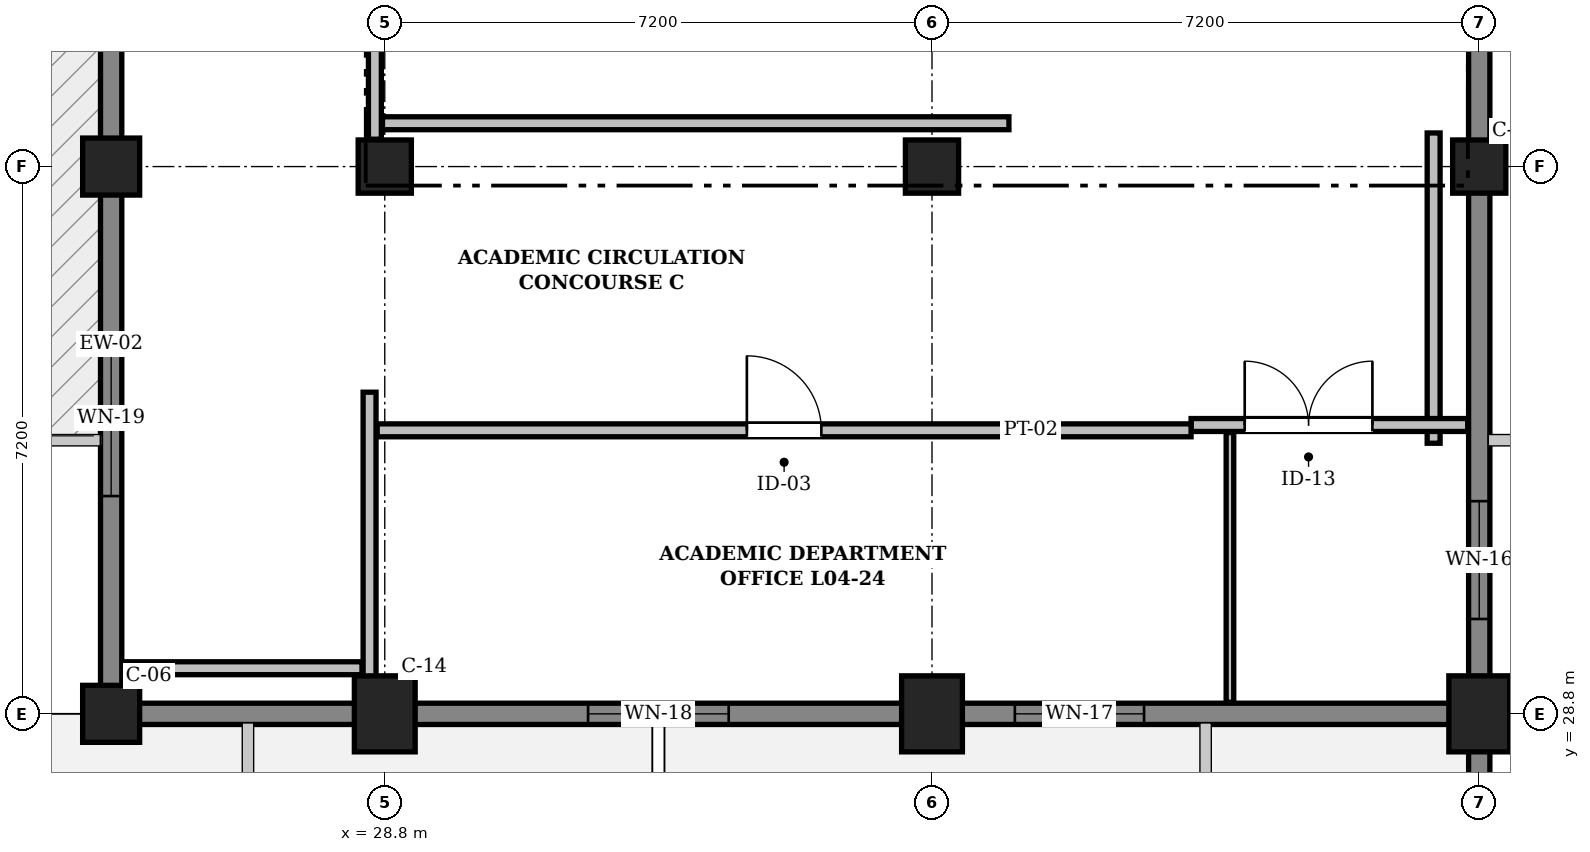
"""IFC4 building model, lengths in metres.
Left out: names, types, materials, properties, quantities, classifications, styles, units other than length and angle.
Written with IfcOpenShell. Run it as: python <this file> out.ifc"""

import sys

from ifc_helpers import new_model, si_unit, direction, frame, frame_2d, origin, origin_2d, place, context, subcontext, project, spatial, rectangle, extrude, element, fill, save


model = new_model("IFC4")
c1 = context("Model", 3, precision=1e-05, world=origin(), true_north=direction((0.0, 1.0)))
c2 = subcontext(c1, "Body", "Model", "MODEL_VIEW")
j1 = project(units=[si_unit("LENGTHUNIT", "METRE"), si_unit("PLANEANGLEUNIT", "RADIAN")], contexts=[c1])
p1 = place(None, origin())
s1 = spatial("IfcSite", under=j1, at=p1, CompositionType="ELEMENT")
p2 = place(p1, origin())
s2 = spatial("IfcBuilding", under=s1, at=p2, CompositionType="ELEMENT")
p3 = place(p2, frame((0.0, 0.0, 18.9)))
s3 = spatial("IfcBuildingStorey", under=s2, at=p3, CompositionType="ELEMENT", Elevation=18.9)
for number, where, z_axis, x_axis in (
    (1, (25.2, 28.8, 0.0), (0.0, 0.0, 1.0), (1.0, 0.0, 0.0)),
    (2, (25.2, 36.0, 0.0), (0.0, 0.0, 1.0), (1.0, 0.0, 0.0)),
):
    element("IfcColumn", number, at=place(p3, frame(where, z_axis=z_axis, x_axis=x_axis)), inside=s3, PredefinedType="COLUMN", context=c2, shape_type="SweptSolid", body=[
        extrude(rectangle(XDim=0.75, YDim=0.75, at=origin_2d()), origin(), (0.0, 0.0, 1.0), 4.5),
    ])
p4 = place(p3, frame((28.8, 28.8, 0.0), z_axis=(0.0, 0.0, 1.0), x_axis=(1.0, 0.0, 0.0)))
e3 = element("IfcColumn", 3, at=p4, inside=s3, PredefinedType="COLUMN", context=c2, shape_type="SweptSolid", body=[
    extrude(rectangle(XDim=0.8, YDim=1.0, at=origin_2d()), origin(), (0.0, 0.0, 1.0), 4.5),
])
p5 = place(p3, frame((28.8, 36.0, 0.0), z_axis=(0.0, 0.0, 1.0), x_axis=(1.0, 0.0, 0.0)))
e4 = element("IfcColumn", 4, at=p5, inside=s3, PredefinedType="COLUMN", context=c2, shape_type="SweptSolid", body=[
    extrude(rectangle(XDim=0.7, YDim=0.7, at=origin_2d()), origin(), (0.0, 0.0, 1.0), 4.5),
])
p6 = place(p3, frame((36.0, 28.8, 0.0), z_axis=(0.0, 0.0, 1.0), x_axis=(1.0, 0.0, 0.0)))
e5 = element("IfcColumn", 5, at=p6, inside=s3, PredefinedType="COLUMN", context=c2, shape_type="SweptSolid", body=[
    extrude(rectangle(XDim=0.8, YDim=1.0, at=origin_2d()), origin(), (0.0, 0.0, 1.0), 4.5),
])
p7 = place(p3, frame((36.0, 36.0, 0.0), z_axis=(0.0, 0.0, 1.0), x_axis=(1.0, 0.0, 0.0)))
e6 = element("IfcColumn", 6, at=p7, inside=s3, PredefinedType="COLUMN", context=c2, shape_type="SweptSolid", body=[
    extrude(rectangle(XDim=0.7, YDim=0.7, at=origin_2d()), origin(), (0.0, 0.0, 1.0), 4.5),
])
p8 = place(p3, frame((43.2, 28.8, 0.0), z_axis=(0.0, 0.0, 1.0), x_axis=(1.0, 0.0, 0.0)))
e7 = element("IfcColumn", 7, at=p8, inside=s3, PredefinedType="COLUMN", context=c2, shape_type="SweptSolid", body=[
    extrude(rectangle(XDim=0.8, YDim=1.0, at=origin_2d()), origin(), (0.0, 0.0, 1.0), 4.5),
])
p9 = place(p3, frame((43.2, 36.0, 0.0), z_axis=(0.0, 0.0, 1.0), x_axis=(1.0, 0.0, 0.0)))
e8 = element("IfcColumn", 8, at=p9, inside=s3, PredefinedType="COLUMN", context=c2, shape_type="SweptSolid", body=[
    extrude(rectangle(XDim=0.7, YDim=0.7, at=origin_2d()), origin(), (0.0, 0.0, 1.0), 4.5),
])
p10 = place(p3, frame((43.2, 21.6, 0.0), z_axis=(0.0, 0.0, 1.0), x_axis=(0.0, 1.0, 0.0)))
e9 = element("IfcWall", 9, at=p10, inside=s3, PredefinedType="SOLIDWALL", context=c2, shape_type="SweptSolid", body=[
    extrude(rectangle(XDim=7.034, YDim=0.28, at=frame_2d((3.517, 0.0))), origin(), (0.0, 0.0, 1.0), 4.22),
])
p11 = place(p10, frame((4.394, 0.0, 0.95)))
e10 = element("IfcOpeningElement", 10, at=p11, cuts=e9, PredefinedType="OPENING", context=c2, shape_type="SweptSolid", body=[
    extrude(rectangle(XDim=1.2, YDim=1.8, at=frame_2d((0.6, 0.9))), frame((0.0, 0.152, 0.0), z_axis=(0.0, -1.0, 0.0), x_axis=(1.0, 0.0, 0.0)), (0.0, 0.0, 1.0), 0.304),
])
p12 = place(p3, frame((43.2, 28.8, 0.0), z_axis=(0.0, 0.0, 1.0), x_axis=(1.0, 0.0, 0.0)))
e11 = element("IfcWall", 11, at=p12, inside=s3, PredefinedType="SOLIDWALL", context=c2, shape_type="SweptSolid", body=[
    extrude(rectangle(XDim=7.2, YDim=0.28, at=frame_2d((3.6, 0.0))), origin(), (0.0, 0.0, 1.0), 4.22),
])
p13 = place(p12, frame((2.875, 0.0, 0.95)))
e12 = element("IfcOpeningElement", 12, at=p13, cuts=e11, PredefinedType="OPENING", context=c2, shape_type="SweptSolid", body=[
    extrude(rectangle(XDim=1.45, YDim=1.8, at=frame_2d((0.725, 0.9))), frame((0.0, 0.152, 0.0), z_axis=(0.0, -1.0, 0.0), x_axis=(1.0, 0.0, 0.0)), (0.0, 0.0, 1.0), 0.304),
])
p14 = place(p3, frame((43.2, 43.2, 0.0), z_axis=(0.0, 0.0, 1.0), x_axis=(0.0, -1.0, 0.0)))
e13 = element("IfcWall", 13, at=p14, inside=s3, PredefinedType="SOLIDWALL", context=c2, shape_type="SweptSolid", body=[
    extrude(rectangle(XDim=7.2, YDim=0.28, at=frame_2d((3.6, 0.0))), origin(), (0.0, 0.0, 1.0), 4.22),
])
p15 = place(p14, frame((2.9, 0.0, 0.95)))
e14 = element("IfcOpeningElement", 14, at=p15, cuts=e13, PredefinedType="OPENING", context=c2, shape_type="SweptSolid", body=[
    extrude(rectangle(XDim=1.4, YDim=1.55, at=frame_2d((0.7, 0.775))), frame((0.0, 0.152, 0.0), z_axis=(0.0, -1.0, 0.0), x_axis=(1.0, 0.0, 0.0)), (0.0, 0.0, 1.0), 0.304),
])
p16 = place(p3, frame((43.2, 36.0, 0.0), z_axis=(0.0, 0.0, 1.0), x_axis=(0.0, -1.0, 0.0)))
e15 = element("IfcWall", 15, at=p16, inside=s3, PredefinedType="SOLIDWALL", context=c2, shape_type="SweptSolid", body=[
    extrude(rectangle(XDim=7.034, YDim=0.28, at=frame_2d((3.517, 0.0))), origin(), (0.0, 0.0, 1.0), 4.22),
])
p17 = place(p16, frame((4.402, 0.0, 0.95)))
e16 = element("IfcOpeningElement", 16, at=p17, cuts=e15, PredefinedType="OPENING", context=c2, shape_type="SweptSolid", body=[
    extrude(rectangle(XDim=1.55, YDim=1.55, at=frame_2d((0.775, 0.775))), frame((0.0, 0.152, 0.0), z_axis=(0.0, -1.0, 0.0), x_axis=(1.0, 0.0, 0.0)), (0.0, 0.0, 1.0), 0.304),
])
p18 = place(p3, frame((43.2, 28.8, 0.0), z_axis=(0.0, 0.0, 1.0), x_axis=(-1.0, 0.0, 0.0)))
e17 = element("IfcWall", 17, at=p18, inside=s3, PredefinedType="SOLIDWALL", context=c2, shape_type="SweptSolid", body=[
    extrude(rectangle(XDim=7.2, YDim=0.28, at=frame_2d((3.6, 0.0))), origin(), (0.0, 0.0, 1.0), 4.22),
])
p19 = place(p18, frame((4.41, 0.0, 0.95)))
e18 = element("IfcOpeningElement", 18, at=p19, cuts=e17, PredefinedType="OPENING", context=c2, shape_type="SweptSolid", body=[
    extrude(rectangle(XDim=1.7, YDim=1.55, at=frame_2d((0.85, 0.775))), frame((0.0, 0.152, 0.0), z_axis=(0.0, -1.0, 0.0), x_axis=(1.0, 0.0, 0.0)), (0.0, 0.0, 1.0), 0.304),
])
p20 = place(p3, frame((36.0, 28.8, 0.0), z_axis=(0.0, 0.0, 1.0), x_axis=(-1.0, 0.0, 0.0)))
e19 = element("IfcWall", 19, at=p20, inside=s3, PredefinedType="SOLIDWALL", context=c2, shape_type="SweptSolid", body=[
    extrude(rectangle(XDim=7.2, YDim=0.28, at=frame_2d((3.6, 0.0))), origin(), (0.0, 0.0, 1.0), 4.22),
])
p21 = place(p20, frame((2.675, 0.0, 0.95)))
e20 = element("IfcOpeningElement", 20, at=p21, cuts=e19, PredefinedType="OPENING", context=c2, shape_type="SweptSolid", body=[
    extrude(rectangle(XDim=1.85, YDim=1.55, at=frame_2d((0.925, 0.775))), frame((0.0, 0.152, 0.0), z_axis=(0.0, -1.0, 0.0), x_axis=(1.0, 0.0, 0.0)), (0.0, 0.0, 1.0), 0.304),
])
p22 = place(p3, frame((28.8, 28.8, 0.0), z_axis=(0.0, 0.0, 1.0), x_axis=(-1.0, 0.0, 0.0)))
e21 = element("IfcWall", 21, at=p22, inside=s3, PredefinedType="SOLIDWALL", context=c2, shape_type="SweptSolid", body=[
    extrude(rectangle(XDim=3.75, YDim=0.28, at=frame_2d((1.875, 0.0))), origin(), (0.0, 0.0, 1.0), 4.22),
])
p23 = place(p3, frame((25.2, 28.966, 0.0), z_axis=(0.0, 0.0, 1.0), x_axis=(0.0, 1.0, 0.0)))
e22 = element("IfcWall", 22, at=p23, inside=s3, PredefinedType="SOLIDWALL", context=c2, shape_type="SweptSolid", body=[
    extrude(rectangle(XDim=7.034, YDim=0.28, at=frame_2d((3.517, 0.0))), origin(), (0.0, 0.0, 1.0), 4.22),
])
p24 = place(p23, frame((2.699, 0.0, 0.95)))
e23 = element("IfcOpeningElement", 23, at=p24, cuts=e22, PredefinedType="OPENING", context=c2, shape_type="SweptSolid", body=[
    extrude(rectangle(XDim=2.05, YDim=1.55, at=frame_2d((1.025, 0.775))), frame((0.0, 0.152, 0.0), z_axis=(0.0, -1.0, 0.0), x_axis=(1.0, 0.0, 0.0)), (0.0, 0.0, 1.0), 0.304),
])
p25 = place(p3, frame((25.2, 36.0, 0.0), z_axis=(0.0, 0.0, 1.0), x_axis=(0.0, 1.0, 0.0)))
e24 = element("IfcWall", 24, at=p25, inside=s3, PredefinedType="SOLIDWALL", context=c2, shape_type="SweptSolid", body=[
    extrude(rectangle(XDim=7.2, YDim=0.28, at=frame_2d((3.6, 0.0))), origin(), (0.0, 0.0, 1.0), 4.22),
])
p26 = place(p25, frame((3.01, 0.0, 0.0)))
e25 = element("IfcOpeningElement", 25, at=p26, cuts=e24, PredefinedType="OPENING", context=c2, shape_type="SweptSolid", body=[
    extrude(rectangle(XDim=1.18, YDim=2.18, at=frame_2d((0.59, 1.09))), frame((0.0, 0.152, 0.0), z_axis=(0.0, -1.0, 0.0), x_axis=(1.0, 0.0, 0.0)), (0.0, 0.0, 1.0), 0.304),
])
p27 = place(p3, frame((28.67, 36.36, 0.0), z_axis=(0.0, 0.0, 1.0), x_axis=(0.0, 1.0, 0.0)))
e26 = element("IfcWall", 26, at=p27, inside=s3, PredefinedType="PARTITIONING", context=c2, shape_type="SweptSolid", body=[
    extrude(rectangle(XDim=6.48, YDim=0.17, at=frame_2d((3.24, 0.0))), origin(), (0.0, 0.0, 1.0), 3.73),
])
p28 = place(p27, frame((2.53, 0.0, 0.0)))
e27 = element("IfcOpeningElement", 27, at=p28, cuts=e26, PredefinedType="OPENING", context=c2, shape_type="SweptSolid", body=[
    extrude(rectangle(XDim=1.42, YDim=2.24, at=frame_2d((0.71, 1.12))), frame((0.0, 0.097, 0.0), z_axis=(0.0, -1.0, 0.0), x_axis=(1.0, 0.0, 0.0)), (0.0, 0.0, 1.0), 0.194),
])
p29 = place(p3, frame((28.6, 28.952, 0.0), z_axis=(0.0, 0.0, 1.0), x_axis=(0.0, 1.0, 0.0)))
e28 = element("IfcWall", 28, at=p29, inside=s3, PredefinedType="PARTITIONING", context=c2, shape_type="SweptSolid", body=[
    extrude(rectangle(XDim=4.08, YDim=0.17, at=frame_2d((2.04, 0.0))), origin(), (0.0, 0.0, 1.0), 3.73),
])
p30 = place(p3, frame((25.352, 29.4, 0.0), z_axis=(0.0, 0.0, 1.0), x_axis=(1.0, 0.0, 0.0)))
e29 = element("IfcWall", 29, at=p30, inside=s3, PredefinedType="PARTITIONING", context=c2, shape_type="SweptSolid", body=[
    extrude(rectangle(XDim=3.148, YDim=0.17, at=frame_2d((1.574, 0.0))), origin(), (0.0, 0.0, 1.0), 4.16),
])
p31 = place(p3, frame((42.6, 32.36, 0.0), z_axis=(0.0, 0.0, 1.0), x_axis=(0.0, 1.0, 0.0)))
e30 = element("IfcWall", 30, at=p31, inside=s3, PredefinedType="PARTITIONING", context=c2, shape_type="SweptSolid", body=[
    extrude(rectangle(XDim=4.082, YDim=0.17, at=frame_2d((2.041, 0.0))), origin(), (0.0, 0.0, 1.0), 4.16),
])
p32 = place(p3, frame((39.408, 32.6, 0.0), z_axis=(0.0, 0.0, 1.0), x_axis=(1.0, 0.0, 0.0)))
e31 = element("IfcWall", 31, at=p32, inside=s3, PredefinedType="PARTITIONING", context=c2, shape_type="SweptSolid", body=[
    extrude(rectangle(XDim=3.64, YDim=0.17, at=frame_2d((1.82, 0.0))), origin(), (0.0, 0.0, 1.0), 4.16),
])
p33 = place(p32, frame((0.706, 0.0, 0.0)))
e32 = element("IfcOpeningElement", 32, at=p33, cuts=e31, PredefinedType="OPENING", context=c2, shape_type="SweptSolid", body=[
    extrude(rectangle(XDim=1.68, YDim=2.28, at=frame_2d((0.84, 1.14))), frame((0.0, 0.097, 0.0), z_axis=(0.0, -1.0, 0.0), x_axis=(1.0, 0.0, 0.0)), (0.0, 0.0, 1.0), 0.194),
])
p34 = place(p3, frame((28.77, 36.57, 0.0), z_axis=(0.0, 0.0, 1.0), x_axis=(1.0, 0.0, 0.0)))
e33 = element("IfcWall", 33, at=p34, inside=s3, PredefinedType="PARTITIONING", context=c2, shape_type="SweptSolid", body=[
    extrude(rectangle(XDim=8.242, YDim=0.17, at=frame_2d((4.121, 0.0))), origin(), (0.0, 0.0, 1.0), 4.16),
])
p35 = place(p3, frame((28.7, 32.53, 0.0), z_axis=(0.0, 0.0, 1.0), x_axis=(1.0, 0.0, 0.0)))
e34 = element("IfcWall", 34, at=p35, inside=s3, PredefinedType="PARTITIONING", context=c2, shape_type="SweptSolid", body=[
    extrude(rectangle(XDim=10.708, YDim=0.17, at=frame_2d((5.354, 0.0))), origin(), (0.0, 0.0, 1.0), 4.16),
])
p36 = place(p35, frame((4.864, 0.0, 0.0)))
e35 = element("IfcOpeningElement", 35, at=p36, cuts=e34, PredefinedType="OPENING", context=c2, shape_type="SweptSolid", body=[
    extrude(rectangle(XDim=0.98, YDim=2.14, at=frame_2d((0.49, 1.07))), frame((0.0, 0.097, 0.0), z_axis=(0.0, -1.0, 0.0), x_axis=(1.0, 0.0, 0.0)), (0.0, 0.0, 1.0), 0.194),
])
p37 = place(p3, frame((39.92, 28.952, 0.0), z_axis=(0.0, 0.0, 1.0), x_axis=(0.0, 1.0, 0.0)))
e36 = element("IfcWall", 36, at=p37, inside=s3, PredefinedType="PARTITIONING", context=c2, shape_type="SweptSolid", body=[
    extrude(rectangle(XDim=3.548, YDim=0.1, at=frame_2d((1.774, 0.0))), origin(), (0.0, 0.0, 1.0), 4.16),
])
p38 = place(p17, origin())
e37 = element("IfcWindow", 37, at=p38, inside=s3, PartitioningType="SINGLE_PANEL", PredefinedType="WINDOW", context=c2, shape_type="SweptSolid", body=[
    extrude(rectangle(XDim=1.55, YDim=1.55, at=frame_2d((0.775, 0.775))), frame((0.0, 0.03, 0.0), z_axis=(0.0, -1.0, 0.0), x_axis=(1.0, 0.0, 0.0)), (0.0, 0.0, 1.0), 0.06),
])
fill(e16, e37)
p39 = place(p19, origin())
e38 = element("IfcWindow", 38, at=p39, inside=s3, PartitioningType="SINGLE_PANEL", PredefinedType="WINDOW", context=c2, shape_type="SweptSolid", body=[
    extrude(rectangle(XDim=1.7, YDim=1.55, at=frame_2d((0.85, 0.775))), frame((0.0, 0.03, 0.0), z_axis=(0.0, -1.0, 0.0), x_axis=(1.0, 0.0, 0.0)), (0.0, 0.0, 1.0), 0.06),
])
fill(e18, e38)
p40 = place(p21, origin())
e39 = element("IfcWindow", 39, at=p40, inside=s3, PartitioningType="SINGLE_PANEL", PredefinedType="WINDOW", context=c2, shape_type="SweptSolid", body=[
    extrude(rectangle(XDim=1.85, YDim=1.55, at=frame_2d((0.925, 0.775))), frame((0.0, 0.03, 0.0), z_axis=(0.0, -1.0, 0.0), x_axis=(1.0, 0.0, 0.0)), (0.0, 0.0, 1.0), 0.06),
])
fill(e20, e39)
p41 = place(p24, origin())
e40 = element("IfcWindow", 40, at=p41, inside=s3, PartitioningType="SINGLE_PANEL", PredefinedType="WINDOW", context=c2, shape_type="SweptSolid", body=[
    extrude(rectangle(XDim=2.05, YDim=1.55, at=frame_2d((1.025, 0.775))), frame((0.0, 0.03, 0.0), z_axis=(0.0, -1.0, 0.0), x_axis=(1.0, 0.0, 0.0)), (0.0, 0.0, 1.0), 0.06),
])
fill(e23, e40)
p42 = place(p36, origin())
e41 = element("IfcDoor", 41, at=p42, inside=s3, OperationType="SINGLE_SWING_LEFT", PredefinedType="DOOR", context=c2, shape_type="SweptSolid", body=[
    extrude(rectangle(XDim=0.98, YDim=2.14, at=frame_2d((0.49, 1.07))), frame((0.0, 0.025, 0.0), z_axis=(0.0, -1.0, 0.0), x_axis=(1.0, 0.0, 0.0)), (0.0, 0.0, 1.0), 0.05),
])
fill(e35, e41)
p43 = place(p33, origin())
e42 = element("IfcDoor", 42, at=p43, inside=s3, OperationType="DOUBLE_DOOR_SINGLE_SWING", PredefinedType="DOOR", context=c2, shape_type="SweptSolid", body=[
    extrude(rectangle(XDim=1.68, YDim=2.28, at=frame_2d((0.84, 1.14))), frame((0.0, 0.025, 0.0), z_axis=(0.0, -1.0, 0.0), x_axis=(1.0, 0.0, 0.0)), (0.0, 0.0, 1.0), 0.05),
])
fill(e32, e42)
save(model, sys.argv[1])
